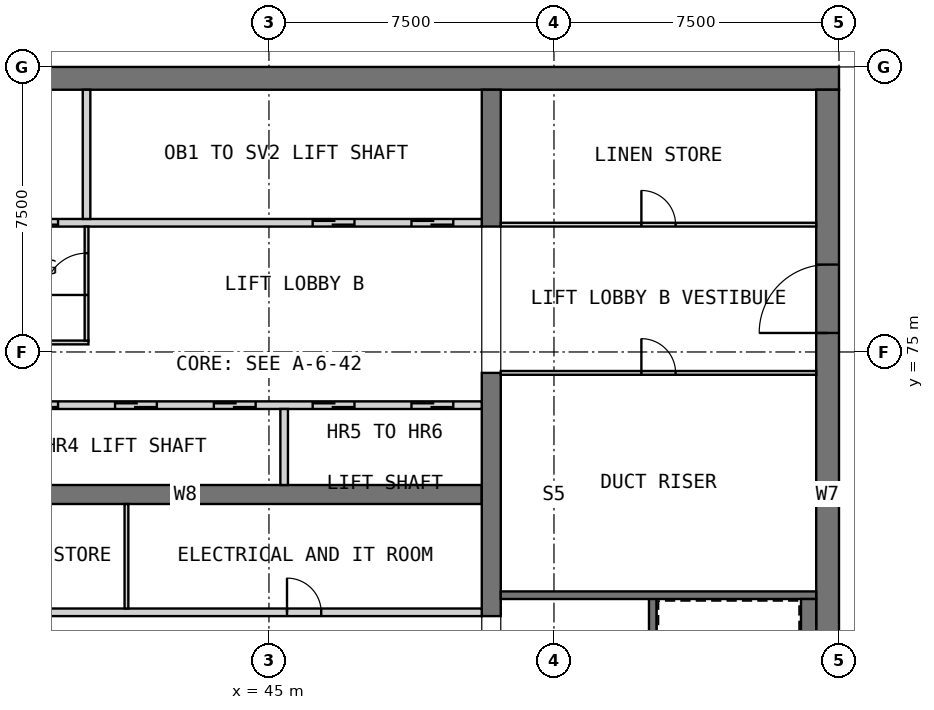
"""IFC4 building model, lengths in metres.
Left out: names, types, materials, properties, quantities, classifications, styles, units other than length and angle.
Written with IfcOpenShell. Run it as: python <this file> out.ifc"""

import sys

from ifc_helpers import new_model, si_unit, direction, frame, frame_2d, origin, place, context, subcontext, project, spatial, rectangle, extrude, element, fill, save


model = new_model("IFC4")
c1 = context("Model", 3, precision=1e-05, world=origin(), true_north=direction((0.0, 1.0)))
c2 = subcontext(c1, "Body", "Model", "MODEL_VIEW")
j1 = project(units=[si_unit("LENGTHUNIT", "METRE"), si_unit("PLANEANGLEUNIT", "RADIAN")], contexts=[c1])
p1 = place(None, origin())
s1 = spatial("IfcSite", under=j1, at=p1, CompositionType="ELEMENT")
p2 = place(p1, origin())
s2 = spatial("IfcBuilding", under=s1, at=p2, CompositionType="ELEMENT")
p3 = place(p2, frame((0.0, 0.0, 276.7)))
s3 = spatial("IfcBuildingStorey", under=s2, at=p3, CompositionType="ELEMENT", Elevation=276.7)
p4 = place(p3, frame((30.0, 82.2, 0.0), z_axis=(0.0, 0.0, 1.0), x_axis=(1.0, 0.0, 0.0)))
e1 = element("IfcWall", 1, at=p4, inside=s3, PredefinedType="SHEAR", context=c2, shape_type="SweptSolid", body=[
    extrude(rectangle(XDim=30.0, YDim=0.6, at=frame_2d((15.0, 0.0))), origin(), (0.0, 0.0, 1.0), 3.5),
])
p5 = place(p3, frame((59.7, 60.6, 0.0), z_axis=(0.0, 0.0, 1.0), x_axis=(0.0, 1.0, 0.0)))
e2 = element("IfcWall", 2, at=p5, inside=s3, PredefinedType="SHEAR", context=c2, shape_type="SweptSolid", body=[
    extrude(rectangle(XDim=21.3, YDim=0.6, at=frame_2d((10.65, 0.0))), origin(), (0.0, 0.0, 1.0), 3.5),
])
p6 = place(p5, frame((14.9, 0.0, 0.0)))
e3 = element("IfcOpeningElement", 3, at=p6, cuts=e2, PredefinedType="OPENING", context=c2, shape_type="SweptSolid", body=[
    extrude(rectangle(XDim=1.8, YDim=2.1, at=frame_2d((0.9, 1.05))), frame((0.0, 0.31, 0.0), z_axis=(0.0, -1.0, 0.0), x_axis=(1.0, 0.0, 0.0)), (0.0, 0.0, 1.0), 0.62),
])
p7 = place(p3, frame((35.0, 71.25, 0.0), z_axis=(0.0, 0.0, 1.0), x_axis=(1.0, 0.0, 0.0)))
e4 = element("IfcWall", 4, at=p7, inside=s3, PredefinedType="SHEAR", context=c2, shape_type="SweptSolid", body=[
    extrude(rectangle(XDim=15.6, YDim=0.5, at=frame_2d((7.8, 0.0))), origin(), (0.0, 0.0, 1.0), 3.5),
])
p8 = place(p3, frame((50.85, 68.05, 0.0), z_axis=(0.0, 0.0, 1.0), x_axis=(0.0, 1.0, 0.0)))
e5 = element("IfcWall", 5, at=p8, inside=s3, PredefinedType="SHEAR", context=c2, shape_type="SweptSolid", body=[
    extrude(rectangle(XDim=6.4, YDim=0.5, at=frame_2d((3.2, 0.0))), origin(), (0.0, 0.0, 1.0), 3.5),
])
p9 = place(p3, frame((50.85, 78.3, 0.0), z_axis=(0.0, 0.0, 1.0), x_axis=(0.0, 1.0, 0.0)))
e6 = element("IfcWall", 6, at=p9, inside=s3, PredefinedType="SHEAR", context=c2, shape_type="SweptSolid", body=[
    extrude(rectangle(XDim=3.6, YDim=0.5, at=frame_2d((1.8, 0.0))), origin(), (0.0, 0.0, 1.0), 3.5),
])
p10 = place(p3, frame((35.0, 68.15, 0.0), z_axis=(0.0, 0.0, 1.0), x_axis=(1.0, 0.0, 0.0)))
e7 = element("IfcWall", 7, at=p10, inside=s3, PredefinedType="PARTITIONING", context=c2, shape_type="SweptSolid", body=[
    extrude(rectangle(XDim=15.6, YDim=0.2, at=frame_2d((7.8, 0.0))), origin(), (0.0, 0.0, 1.0), 3.25),
])
p11 = place(p10, frame((2.675, 0.0, 0.0)))
e8 = element("IfcOpeningElement", 8, at=p11, cuts=e7, PredefinedType="OPENING", context=c2, shape_type="SweptSolid", body=[
    extrude(rectangle(XDim=0.9, YDim=2.1, at=frame_2d((0.45, 1.05))), frame((0.0, 0.11, 0.0), z_axis=(0.0, -1.0, 0.0), x_axis=(1.0, 0.0, 0.0)), (0.0, 0.0, 1.0), 0.22),
])
p12 = place(p10, frame((10.475, 0.0, 0.0)))
e9 = element("IfcOpeningElement", 9, at=p12, cuts=e7, PredefinedType="OPENING", context=c2, shape_type="SweptSolid", body=[
    extrude(rectangle(XDim=0.9, YDim=2.1, at=frame_2d((0.45, 1.05))), frame((0.0, 0.11, 0.0), z_axis=(0.0, -1.0, 0.0), x_axis=(1.0, 0.0, 0.0)), (0.0, 0.0, 1.0), 0.22),
])
p13 = place(p3, frame((41.25, 68.25, 0.0), z_axis=(0.0, 0.0, 1.0), x_axis=(0.0, 1.0, 0.0)))
e10 = element("IfcWall", 10, at=p13, inside=s3, PredefinedType="PARTITIONING", context=c2, shape_type="SweptSolid", body=[
    extrude(rectangle(XDim=2.75, YDim=0.1, at=frame_2d((1.375, 0.0))), origin(), (0.0, 0.0, 1.0), 3.25),
])
p14 = place(p3, frame((35.0, 73.6, 0.0), z_axis=(0.0, 0.0, 1.0), x_axis=(1.0, 0.0, 0.0)))
e11 = element("IfcWall", 11, at=p14, inside=s3, PredefinedType="SOLIDWALL", context=c2, shape_type="SweptSolid", body=[
    extrude(rectangle(XDim=15.6, YDim=0.2, at=frame_2d((7.8, 0.0))), origin(), (0.0, 0.0, 1.0), 3.5),
])
p15 = place(p14, frame((0.75, 0.0, 0.0)))
e12 = element("IfcOpeningElement", 12, at=p15, cuts=e11, PredefinedType="OPENING", context=c2, shape_type="SweptSolid", body=[
    extrude(rectangle(XDim=1.1, YDim=2.1, at=frame_2d((0.55, 1.05))), frame((0.0, 0.11, 0.0), z_axis=(0.0, -1.0, 0.0), x_axis=(1.0, 0.0, 0.0)), (0.0, 0.0, 1.0), 0.22),
])
p16 = place(p14, frame((3.35, 0.0, 0.0)))
e13 = element("IfcOpeningElement", 13, at=p16, cuts=e11, PredefinedType="OPENING", context=c2, shape_type="SweptSolid", body=[
    extrude(rectangle(XDim=1.1, YDim=2.1, at=frame_2d((0.55, 1.05))), frame((0.0, 0.11, 0.0), z_axis=(0.0, -1.0, 0.0), x_axis=(1.0, 0.0, 0.0)), (0.0, 0.0, 1.0), 0.22),
])
p17 = place(p14, frame((5.95, 0.0, 0.0)))
e14 = element("IfcOpeningElement", 14, at=p17, cuts=e11, PredefinedType="OPENING", context=c2, shape_type="SweptSolid", body=[
    extrude(rectangle(XDim=1.1, YDim=2.1, at=frame_2d((0.55, 1.05))), frame((0.0, 0.11, 0.0), z_axis=(0.0, -1.0, 0.0), x_axis=(1.0, 0.0, 0.0)), (0.0, 0.0, 1.0), 0.22),
])
p18 = place(p14, frame((8.55, 0.0, 0.0)))
e15 = element("IfcOpeningElement", 15, at=p18, cuts=e11, PredefinedType="OPENING", context=c2, shape_type="SweptSolid", body=[
    extrude(rectangle(XDim=1.1, YDim=2.1, at=frame_2d((0.55, 1.05))), frame((0.0, 0.11, 0.0), z_axis=(0.0, -1.0, 0.0), x_axis=(1.0, 0.0, 0.0)), (0.0, 0.0, 1.0), 0.22),
])
p19 = place(p14, frame((11.15, 0.0, 0.0)))
e16 = element("IfcOpeningElement", 16, at=p19, cuts=e11, PredefinedType="OPENING", context=c2, shape_type="SweptSolid", body=[
    extrude(rectangle(XDim=1.1, YDim=2.1, at=frame_2d((0.55, 1.05))), frame((0.0, 0.11, 0.0), z_axis=(0.0, -1.0, 0.0), x_axis=(1.0, 0.0, 0.0)), (0.0, 0.0, 1.0), 0.22),
])
p20 = place(p14, frame((13.75, 0.0, 0.0)))
e17 = element("IfcOpeningElement", 17, at=p20, cuts=e11, PredefinedType="OPENING", context=c2, shape_type="SweptSolid", body=[
    extrude(rectangle(XDim=1.1, YDim=2.1, at=frame_2d((0.55, 1.05))), frame((0.0, 0.11, 0.0), z_axis=(0.0, -1.0, 0.0), x_axis=(1.0, 0.0, 0.0)), (0.0, 0.0, 1.0), 0.22),
])
p21 = place(p3, frame((45.4, 71.5, 0.0), z_axis=(0.0, 0.0, 1.0), x_axis=(0.0, 1.0, 0.0)))
e18 = element("IfcWall", 18, at=p21, inside=s3, PredefinedType="SOLIDWALL", context=c2, shape_type="SweptSolid", body=[
    extrude(rectangle(XDim=2.0, YDim=0.2, at=frame_2d((1.0, 0.0))), origin(), (0.0, 0.0, 1.0), 3.5),
])
p22 = place(p3, frame((35.0, 78.4, 0.0), z_axis=(0.0, 0.0, 1.0), x_axis=(1.0, 0.0, 0.0)))
e19 = element("IfcWall", 19, at=p22, inside=s3, PredefinedType="SOLIDWALL", context=c2, shape_type="SweptSolid", body=[
    extrude(rectangle(XDim=15.6, YDim=0.2, at=frame_2d((7.8, 0.0))), origin(), (0.0, 0.0, 1.0), 3.5),
])
p23 = place(p22, frame((0.75, 0.0, 0.0)))
e20 = element("IfcOpeningElement", 20, at=p23, cuts=e19, PredefinedType="OPENING", context=c2, shape_type="SweptSolid", body=[
    extrude(rectangle(XDim=1.1, YDim=2.1, at=frame_2d((0.55, 1.05))), frame((0.0, 0.11, 0.0), z_axis=(0.0, -1.0, 0.0), x_axis=(1.0, 0.0, 0.0)), (0.0, 0.0, 1.0), 0.22),
])
p24 = place(p22, frame((3.35, 0.0, 0.0)))
e21 = element("IfcOpeningElement", 21, at=p24, cuts=e19, PredefinedType="OPENING", context=c2, shape_type="SweptSolid", body=[
    extrude(rectangle(XDim=1.1, YDim=2.1, at=frame_2d((0.55, 1.05))), frame((0.0, 0.11, 0.0), z_axis=(0.0, -1.0, 0.0), x_axis=(1.0, 0.0, 0.0)), (0.0, 0.0, 1.0), 0.22),
])
p25 = place(p22, frame((11.15, 0.0, 0.0)))
e22 = element("IfcOpeningElement", 22, at=p25, cuts=e19, PredefinedType="OPENING", context=c2, shape_type="SweptSolid", body=[
    extrude(rectangle(XDim=1.1, YDim=2.1, at=frame_2d((0.55, 1.05))), frame((0.0, 0.11, 0.0), z_axis=(0.0, -1.0, 0.0), x_axis=(1.0, 0.0, 0.0)), (0.0, 0.0, 1.0), 0.22),
])
p26 = place(p22, frame((13.75, 0.0, 0.0)))
e23 = element("IfcOpeningElement", 23, at=p26, cuts=e19, PredefinedType="OPENING", context=c2, shape_type="SweptSolid", body=[
    extrude(rectangle(XDim=1.1, YDim=2.1, at=frame_2d((0.55, 1.05))), frame((0.0, 0.11, 0.0), z_axis=(0.0, -1.0, 0.0), x_axis=(1.0, 0.0, 0.0)), (0.0, 0.0, 1.0), 0.22),
])
p27 = place(p3, frame((40.2, 78.5, 0.0), z_axis=(0.0, 0.0, 1.0), x_axis=(0.0, 1.0, 0.0)))
e24 = element("IfcWall", 24, at=p27, inside=s3, PredefinedType="SOLIDWALL", context=c2, shape_type="SweptSolid", body=[
    extrude(rectangle(XDim=3.4, YDim=0.2, at=frame_2d((1.7, 0.0))), origin(), (0.0, 0.0, 1.0), 3.5),
])
p28 = place(p3, frame((35.0, 75.25, 0.0), z_axis=(0.0, 0.0, 1.0), x_axis=(1.0, 0.0, 0.0)))
e25 = element("IfcWall", 25, at=p28, inside=s3, PredefinedType="PARTITIONING", context=c2, shape_type="SweptSolid", body=[
    extrude(rectangle(XDim=5.25, YDim=0.1, at=frame_2d((2.625, 0.0))), origin(), (0.0, 0.0, 1.0), 3.25),
])
p29 = place(p3, frame((40.2, 75.3, 0.0), z_axis=(0.0, 0.0, 1.0), x_axis=(0.0, 1.0, 0.0)))
e26 = element("IfcWall", 26, at=p29, inside=s3, PredefinedType="PARTITIONING", context=c2, shape_type="SweptSolid", body=[
    extrude(rectangle(XDim=3.0, YDim=0.1, at=frame_2d((1.5, 0.0))), origin(), (0.0, 0.0, 1.0), 3.25),
])
p30 = place(p29, frame((1.2, 0.0, 0.0)))
e27 = element("IfcOpeningElement", 27, at=p30, cuts=e26, PredefinedType="OPENING", context=c2, shape_type="SweptSolid", body=[
    extrude(rectangle(XDim=1.1, YDim=2.1, at=frame_2d((0.55, 1.05))), frame((0.0, 0.06, 0.0), z_axis=(0.0, -1.0, 0.0), x_axis=(1.0, 0.0, 0.0)), (0.0, 0.0, 1.0), 0.12),
])
p31 = place(p3, frame((55.1, 60.6, 0.0), z_axis=(0.0, 0.0, 1.0), x_axis=(0.0, 1.0, 0.0)))
e28 = element("IfcWall", 28, at=p31, inside=s3, PredefinedType="SOLIDWALL", context=c2, shape_type="SweptSolid", body=[
    extrude(rectangle(XDim=8.0, YDim=0.2, at=frame_2d((4.0, 0.0))), origin(), (0.0, 0.0, 1.0), 3.25),
])
p32 = place(p3, frame((51.1, 68.6, 0.0), z_axis=(0.0, 0.0, 1.0), x_axis=(1.0, 0.0, 0.0)))
e29 = element("IfcWall", 29, at=p32, inside=s3, PredefinedType="SOLIDWALL", context=c2, shape_type="SweptSolid", body=[
    extrude(rectangle(XDim=8.3, YDim=0.2, at=frame_2d((4.15, 0.0))), origin(), (0.0, 0.0, 1.0), 3.25),
])
p33 = place(p3, frame((59.2, 60.6, 0.0), z_axis=(0.0, 0.0, 1.0), x_axis=(0.0, 1.0, 0.0)))
e30 = element("IfcWall", 30, at=p33, inside=s3, PredefinedType="SOLIDWALL", context=c2, shape_type="SweptSolid", body=[
    extrude(rectangle(XDim=7.9, YDim=0.4, at=frame_2d((3.95, 0.0))), origin(), (0.0, 0.0, 1.0), 3.25),
])
p34 = place(p3, frame((51.1, 74.45, 0.0), z_axis=(0.0, 0.0, 1.0), x_axis=(1.0, 0.0, 0.0)))
e31 = element("IfcWall", 31, at=p34, inside=s3, PredefinedType="PARTITIONING", context=c2, shape_type="SweptSolid", body=[
    extrude(rectangle(XDim=8.3, YDim=0.1, at=frame_2d((4.15, 0.0))), origin(), (0.0, 0.0, 1.0), 3.25),
])
p35 = place(p34, frame((3.7, 0.0, 0.0)))
e32 = element("IfcOpeningElement", 32, at=p35, cuts=e31, PredefinedType="OPENING", context=c2, shape_type="SweptSolid", body=[
    extrude(rectangle(XDim=0.9, YDim=2.1, at=frame_2d((0.45, 1.05))), frame((0.0, 0.06, 0.0), z_axis=(0.0, -1.0, 0.0), x_axis=(1.0, 0.0, 0.0)), (0.0, 0.0, 1.0), 0.12),
])
p36 = place(p3, frame((51.1, 78.35, 0.0), z_axis=(0.0, 0.0, 1.0), x_axis=(1.0, 0.0, 0.0)))
e33 = element("IfcWall", 33, at=p36, inside=s3, PredefinedType="PARTITIONING", context=c2, shape_type="SweptSolid", body=[
    extrude(rectangle(XDim=8.3, YDim=0.1, at=frame_2d((4.15, 0.0))), origin(), (0.0, 0.0, 1.0), 3.25),
])
p37 = place(p36, frame((3.7, 0.0, 0.0)))
e34 = element("IfcOpeningElement", 34, at=p37, cuts=e33, PredefinedType="OPENING", context=c2, shape_type="SweptSolid", body=[
    extrude(rectangle(XDim=0.9, YDim=2.1, at=frame_2d((0.45, 1.05))), frame((0.0, 0.06, 0.0), z_axis=(0.0, -1.0, 0.0), x_axis=(1.0, 0.0, 0.0)), (0.0, 0.0, 1.0), 0.12),
])
p38 = place(p12, origin())
e35 = element("IfcDoor", 35, at=p38, inside=s3, OperationType="SINGLE_SWING_RIGHT", PredefinedType="DOOR", context=c2, shape_type="SweptSolid", body=[
    extrude(rectangle(XDim=0.9, YDim=2.1, at=frame_2d((0.45, 1.05))), frame((0.0, 0.025, 0.0), z_axis=(0.0, -1.0, 0.0), x_axis=(1.0, 0.0, 0.0)), (0.0, 0.0, 1.0), 0.05),
])
fill(e9, e35)
p39 = place(p16, origin())
e36 = element("IfcDoor", 36, at=p39, inside=s3, OperationType="DOUBLE_DOOR_SLIDING", PredefinedType="DOOR", context=c2, shape_type="SweptSolid", body=[
    extrude(rectangle(XDim=1.1, YDim=2.1, at=frame_2d((0.55, 1.05))), frame((0.0, 0.025, 0.0), z_axis=(0.0, -1.0, 0.0), x_axis=(1.0, 0.0, 0.0)), (0.0, 0.0, 1.0), 0.05),
])
fill(e13, e36)
p40 = place(p17, origin())
e37 = element("IfcDoor", 37, at=p40, inside=s3, OperationType="DOUBLE_DOOR_SLIDING", PredefinedType="DOOR", context=c2, shape_type="SweptSolid", body=[
    extrude(rectangle(XDim=1.1, YDim=2.1, at=frame_2d((0.55, 1.05))), frame((0.0, 0.025, 0.0), z_axis=(0.0, -1.0, 0.0), x_axis=(1.0, 0.0, 0.0)), (0.0, 0.0, 1.0), 0.05),
])
fill(e14, e37)
p41 = place(p18, origin())
e38 = element("IfcDoor", 38, at=p41, inside=s3, OperationType="DOUBLE_DOOR_SLIDING", PredefinedType="DOOR", context=c2, shape_type="SweptSolid", body=[
    extrude(rectangle(XDim=1.1, YDim=2.1, at=frame_2d((0.55, 1.05))), frame((0.0, 0.025, 0.0), z_axis=(0.0, -1.0, 0.0), x_axis=(1.0, 0.0, 0.0)), (0.0, 0.0, 1.0), 0.05),
])
fill(e15, e38)
p42 = place(p19, origin())
e39 = element("IfcDoor", 39, at=p42, inside=s3, OperationType="DOUBLE_DOOR_SLIDING", PredefinedType="DOOR", context=c2, shape_type="SweptSolid", body=[
    extrude(rectangle(XDim=1.1, YDim=2.1, at=frame_2d((0.55, 1.05))), frame((0.0, 0.025, 0.0), z_axis=(0.0, -1.0, 0.0), x_axis=(1.0, 0.0, 0.0)), (0.0, 0.0, 1.0), 0.05),
])
fill(e16, e39)
p43 = place(p20, origin())
e40 = element("IfcDoor", 40, at=p43, inside=s3, OperationType="DOUBLE_DOOR_SLIDING", PredefinedType="DOOR", context=c2, shape_type="SweptSolid", body=[
    extrude(rectangle(XDim=1.1, YDim=2.1, at=frame_2d((0.55, 1.05))), frame((0.0, 0.025, 0.0), z_axis=(0.0, -1.0, 0.0), x_axis=(1.0, 0.0, 0.0)), (0.0, 0.0, 1.0), 0.05),
])
fill(e17, e40)
p44 = place(p24, origin())
e41 = element("IfcDoor", 41, at=p44, inside=s3, OperationType="DOUBLE_DOOR_SLIDING", PredefinedType="DOOR", context=c2, shape_type="SweptSolid", body=[
    extrude(rectangle(XDim=1.1, YDim=2.1, at=frame_2d((0.55, 1.05))), frame((0.0, 0.025, 0.0), z_axis=(0.0, -1.0, 0.0), x_axis=(1.0, 0.0, 0.0)), (0.0, 0.0, 1.0), 0.05),
])
fill(e21, e41)
p45 = place(p25, origin())
e42 = element("IfcDoor", 42, at=p45, inside=s3, OperationType="DOUBLE_DOOR_SLIDING", PredefinedType="DOOR", context=c2, shape_type="SweptSolid", body=[
    extrude(rectangle(XDim=1.1, YDim=2.1, at=frame_2d((0.55, 1.05))), frame((0.0, 0.025, 0.0), z_axis=(0.0, -1.0, 0.0), x_axis=(1.0, 0.0, 0.0)), (0.0, 0.0, 1.0), 0.05),
])
fill(e22, e42)
p46 = place(p26, origin())
e43 = element("IfcDoor", 43, at=p46, inside=s3, OperationType="DOUBLE_DOOR_SLIDING", PredefinedType="DOOR", context=c2, shape_type="SweptSolid", body=[
    extrude(rectangle(XDim=1.1, YDim=2.1, at=frame_2d((0.55, 1.05))), frame((0.0, 0.025, 0.0), z_axis=(0.0, -1.0, 0.0), x_axis=(1.0, 0.0, 0.0)), (0.0, 0.0, 1.0), 0.05),
])
fill(e23, e43)
p47 = place(p6, origin())
e44 = element("IfcDoor", 44, at=p47, inside=s3, OperationType="DOUBLE_DOOR_SINGLE_SWING", PredefinedType="DOOR", context=c2, shape_type="SweptSolid", body=[
    extrude(rectangle(XDim=1.8, YDim=2.1, at=frame_2d((0.9, 1.05))), frame((0.0, 0.025, 0.0), z_axis=(0.0, -1.0, 0.0), x_axis=(1.0, 0.0, 0.0)), (0.0, 0.0, 1.0), 0.05),
])
fill(e3, e44)
p48 = place(p30, origin())
e45 = element("IfcDoor", 45, at=p48, inside=s3, OperationType="SINGLE_SWING_LEFT", PredefinedType="DOOR", context=c2, shape_type="SweptSolid", body=[
    extrude(rectangle(XDim=1.1, YDim=2.1, at=frame_2d((0.55, 1.05))), frame((0.0, 0.025, 0.0), z_axis=(0.0, -1.0, 0.0), x_axis=(1.0, 0.0, 0.0)), (0.0, 0.0, 1.0), 0.05),
])
fill(e27, e45)
p49 = place(p35, origin())
e46 = element("IfcDoor", 46, at=p49, inside=s3, OperationType="SINGLE_SWING_LEFT", PredefinedType="DOOR", context=c2, shape_type="SweptSolid", body=[
    extrude(rectangle(XDim=0.9, YDim=2.1, at=frame_2d((0.45, 1.05))), frame((0.0, 0.025, 0.0), z_axis=(0.0, -1.0, 0.0), x_axis=(1.0, 0.0, 0.0)), (0.0, 0.0, 1.0), 0.05),
])
fill(e32, e46)
p50 = place(p37, origin())
e47 = element("IfcDoor", 47, at=p50, inside=s3, OperationType="SINGLE_SWING_LEFT", PredefinedType="DOOR", context=c2, shape_type="SweptSolid", body=[
    extrude(rectangle(XDim=0.9, YDim=2.1, at=frame_2d((0.45, 1.05))), frame((0.0, 0.025, 0.0), z_axis=(0.0, -1.0, 0.0), x_axis=(1.0, 0.0, 0.0)), (0.0, 0.0, 1.0), 0.05),
])
fill(e34, e47)
save(model, sys.argv[1])
